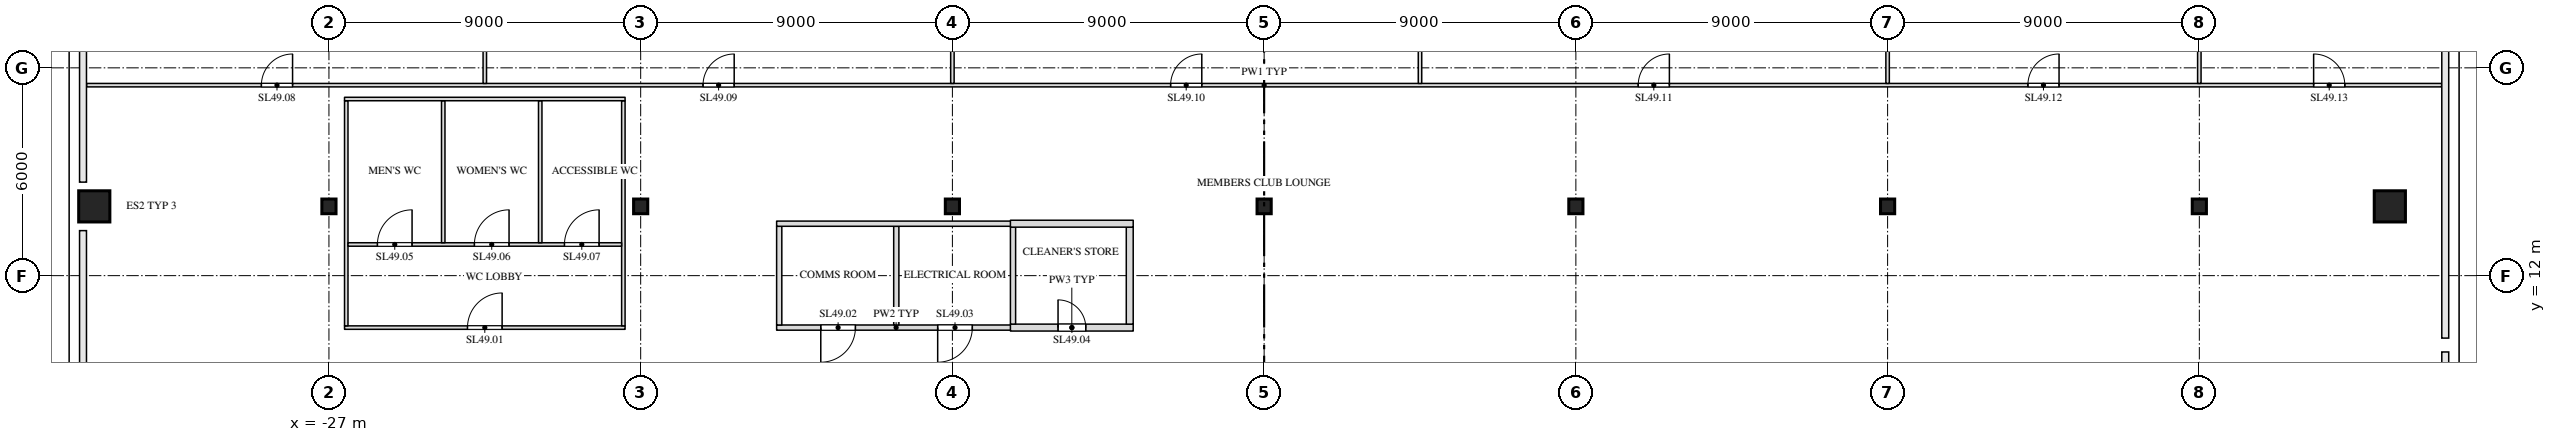
"""IFC4 building model, lengths in metres.
Left out: names, types, materials, properties, quantities, classifications, styles, units other than length and angle.
Written with IfcOpenShell. Run it as: python <this file> out.ifc"""

import sys

from ifc_helpers import new_model, si_unit, direction, frame, frame_2d, origin, origin_2d, place, context, subcontext, project, spatial, rectangle, i_section, extrude, clip, halfspace, element, fill, save


model = new_model("IFC4")
c1 = context("Model", 3, precision=1e-05, world=origin(), true_north=direction((0.0, 1.0)))
c2 = subcontext(c1, "Body", "Model", "MODEL_VIEW")
j1 = project(units=[si_unit("LENGTHUNIT", "METRE"), si_unit("PLANEANGLEUNIT", "RADIAN")], contexts=[c1])
p1 = place(None, origin())
s1 = spatial("IfcSite", under=j1, at=p1, CompositionType="ELEMENT")
p2 = place(p1, origin())
s2 = spatial("IfcBuilding", under=s1, at=p2, CompositionType="ELEMENT")
p3 = place(p2, frame((0.0, 0.0, 212.5)))
s3 = spatial("IfcBuildingStorey", under=s2, at=p3, CompositionType="ELEMENT", Elevation=212.5)
p4 = place(p3, frame((-32.5, 14.0, 0.0), z_axis=(-0.728199992693, 0.0, 0.685364699005), x_axis=(0.0, -1.0, 0.0)))
e1 = element("IfcColumn", 1, at=p4, inside=s3, PredefinedType="COLUMN", context=c2, shape_type="Clipping", body=[
    clip(extrude(rectangle(XDim=0.9, YDim=0.9, at=origin_2d()), origin(), (0.0, 0.0, 1.0), 5.836), halfspace(frame((0.0, 0.0, 0.478)), True)),
])
for number, where, z_axis, x_axis in (
    (2, (-27.0, 14.0, 0.0), (0.0, 0.0, 1.0), (1.0, 0.0, 0.0)),
    (3, (-18.0, 14.0, 0.0), (0.0, 0.0, 1.0), (1.0, 0.0, 0.0)),
    (4, (-9.0, 14.0, 0.0), (0.0, 0.0, 1.0), (1.0, 0.0, 0.0)),
    (5, (0.0, 14.0, 0.0), (0.0, 0.0, 1.0), (1.0, 0.0, 0.0)),
    (6, (9.0, 14.0, 0.0), (0.0, 0.0, 1.0), (1.0, 0.0, 0.0)),
    (7, (18.0, 14.0, 0.0), (0.0, 0.0, 1.0), (1.0, 0.0, 0.0)),
    (8, (27.0, 14.0, 0.0), (0.0, 0.0, 1.0), (1.0, 0.0, 0.0)),
):
    element("IfcColumn", number, at=place(p3, frame(where, z_axis=z_axis, x_axis=x_axis)), inside=s3, PredefinedType="COLUMN", context=c2, shape_type="SweptSolid", body=[
        extrude(i_section(OverallWidth=0.409, OverallDepth=0.424, WebThickness=0.033, FlangeThickness=0.052, at=origin_2d()), origin(), (0.0, 0.0, 1.0), 4.0),
    ])
p5 = place(p3, frame((32.5, 14.0, 0.0), z_axis=(0.0, 0.0, 1.0), x_axis=(1.0, 0.0, 0.0)))
e9 = element("IfcColumn", 9, at=p5, inside=s3, PredefinedType="COLUMN", context=c2, shape_type="SweptSolid", body=[
    extrude(rectangle(XDim=0.9, YDim=0.9, at=origin_2d()), origin(), (0.0, 0.0, 1.0), 4.0),
])
p6 = place(p3, frame((-26.55, 10.5, 0.0), z_axis=(0.0, 0.0, 1.0), x_axis=(1.0, 0.0, 0.0)))
e10 = element("IfcWall", 10, at=p6, inside=s3, PredefinedType="PARTITIONING", context=c2, shape_type="SweptSolid", body=[
    extrude(rectangle(XDim=8.1, YDim=0.1, at=frame_2d((4.05, 0.0))), origin(), (0.0, 0.0, 1.0), 3.65),
])
p7 = place(p6, frame((3.55, 0.0, 0.0)))
e11 = element("IfcOpeningElement", 11, at=p7, cuts=e10, PredefinedType="OPENING", context=c2, shape_type="SweptSolid", body=[
    extrude(rectangle(XDim=1.0, YDim=2.1, at=frame_2d((0.5, 1.05))), frame((0.0, 0.062, 0.0), z_axis=(0.0, -1.0, 0.0), x_axis=(1.0, 0.0, 0.0)), (0.0, 0.0, 1.0), 0.124),
])
for number, where, z_axis, x_axis in (
    (12, (-26.5, 10.55, 0.0), (0.0, 0.0, 1.0), (0.0, 1.0, 0.0)),
    (13, (-18.5, 10.55, 0.0), (0.0, 0.0, 1.0), (0.0, 1.0, 0.0)),
):
    element("IfcWall", number, at=place(p3, frame(where, z_axis=z_axis, x_axis=x_axis)), inside=s3, PredefinedType="PARTITIONING", context=c2, shape_type="SweptSolid", body=[
        extrude(rectangle(XDim=6.5, YDim=0.1, at=frame_2d((3.25, 0.0))), origin(), (0.0, 0.0, 1.0), 3.65),
    ])
p8 = place(p3, frame((-14.075, 10.5, 0.0), z_axis=(0.0, 0.0, 1.0), x_axis=(1.0, 0.0, 0.0)))
e14 = element("IfcWall", 14, at=p8, inside=s3, PredefinedType="PARTITIONING", context=c2, shape_type="SweptSolid", body=[
    extrude(rectangle(XDim=6.9, YDim=0.15, at=frame_2d((3.45, 0.0))), origin(), (0.0, 0.0, 1.0), 3.65),
])
p9 = place(p8, frame((1.275, 0.0, 0.0)))
e15 = element("IfcOpeningElement", 15, at=p9, cuts=e14, PredefinedType="OPENING", context=c2, shape_type="SweptSolid", body=[
    extrude(rectangle(XDim=1.0, YDim=2.1, at=frame_2d((0.5, 1.05))), frame((0.0, 0.087, 0.0), z_axis=(0.0, -1.0, 0.0), x_axis=(1.0, 0.0, 0.0)), (0.0, 0.0, 1.0), 0.174),
])
p10 = place(p8, frame((4.65, 0.0, 0.0)))
e16 = element("IfcOpeningElement", 16, at=p10, cuts=e14, PredefinedType="OPENING", context=c2, shape_type="SweptSolid", body=[
    extrude(rectangle(XDim=1.0, YDim=2.1, at=frame_2d((0.5, 1.05))), frame((0.0, 0.087, 0.0), z_axis=(0.0, -1.0, 0.0), x_axis=(1.0, 0.0, 0.0)), (0.0, 0.0, 1.0), 0.174),
])
for number, where, z_axis, x_axis in (
    (17, (-14.0, 10.575, 0.0), (0.0, 0.0, 1.0), (0.0, 1.0, 0.0)),
    (18, (-10.62, 10.575, 0.0), (0.0, 0.0, 1.0), (0.0, 1.0, 0.0)),
):
    element("IfcWall", number, at=place(p3, frame(where, z_axis=z_axis, x_axis=x_axis)), inside=s3, PredefinedType="PARTITIONING", context=c2, shape_type="SweptSolid", body=[
        extrude(rectangle(XDim=2.85, YDim=0.15, at=frame_2d((1.425, 0.0))), origin(), (0.0, 0.0, 1.0), 3.65),
    ])
p11 = place(p3, frame((-7.325, 10.5, 0.0), z_axis=(0.0, 0.0, 1.0), x_axis=(1.0, 0.0, 0.0)))
e19 = element("IfcWall", 19, at=p11, inside=s3, PredefinedType="PARTITIONING", context=c2, shape_type="SweptSolid", body=[
    extrude(rectangle(XDim=3.545, YDim=0.2, at=frame_2d((1.772, 0.0))), origin(), (0.0, 0.0, 1.0), 3.65),
])
p12 = place(p11, frame((1.375, 0.0, 0.0)))
e20 = element("IfcOpeningElement", 20, at=p12, cuts=e19, PredefinedType="OPENING", context=c2, shape_type="SweptSolid", body=[
    extrude(rectangle(XDim=0.8, YDim=2.1, at=frame_2d((0.4, 1.05))), frame((0.0, 0.112, 0.0), z_axis=(0.0, -1.0, 0.0), x_axis=(1.0, 0.0, 0.0)), (0.0, 0.0, 1.0), 0.224),
])
p13 = place(p3, frame((-7.25, 10.6, 0.0), z_axis=(0.0, 0.0, 1.0), x_axis=(0.0, 1.0, 0.0)))
e21 = element("IfcWall", 21, at=p13, inside=s3, PredefinedType="PARTITIONING", context=c2, shape_type="SweptSolid", body=[
    extrude(rectangle(XDim=2.8, YDim=0.15, at=frame_2d((1.4, 0.0))), origin(), (0.0, 0.0, 1.0), 3.65),
])
p14 = place(p3, frame((-3.88, 10.6, 0.0), z_axis=(0.0, 0.0, 1.0), x_axis=(0.0, 1.0, 0.0)))
e22 = element("IfcWall", 22, at=p14, inside=s3, PredefinedType="PARTITIONING", context=c2, shape_type="SweptSolid", body=[
    extrude(rectangle(XDim=2.8, YDim=0.2, at=frame_2d((1.4, 0.0))), origin(), (0.0, 0.0, 1.0), 3.65),
])
p15 = place(p3, frame((-26.45, 12.9, 0.0), z_axis=(0.0, 0.0, 1.0), x_axis=(1.0, 0.0, 0.0)))
e23 = element("IfcWall", 23, at=p15, inside=s3, PredefinedType="PARTITIONING", context=c2, shape_type="SweptSolid", body=[
    extrude(rectangle(XDim=7.9, YDim=0.1, at=frame_2d((3.95, 0.0))), origin(), (0.0, 0.0, 1.0), 3.65),
])
p16 = place(p15, frame((0.85, 0.0, 0.0)))
e24 = element("IfcOpeningElement", 24, at=p16, cuts=e23, PredefinedType="OPENING", context=c2, shape_type="SweptSolid", body=[
    extrude(rectangle(XDim=1.0, YDim=2.1, at=frame_2d((0.5, 1.05))), frame((0.0, 0.062, 0.0), z_axis=(0.0, -1.0, 0.0), x_axis=(1.0, 0.0, 0.0)), (0.0, 0.0, 1.0), 0.124),
])
p17 = place(p15, frame((3.65, 0.0, 0.0)))
e25 = element("IfcOpeningElement", 25, at=p17, cuts=e23, PredefinedType="OPENING", context=c2, shape_type="SweptSolid", body=[
    extrude(rectangle(XDim=1.0, YDim=2.1, at=frame_2d((0.5, 1.05))), frame((0.0, 0.062, 0.0), z_axis=(0.0, -1.0, 0.0), x_axis=(1.0, 0.0, 0.0)), (0.0, 0.0, 1.0), 0.124),
])
p18 = place(p15, frame((6.25, 0.0, 0.0)))
e26 = element("IfcOpeningElement", 26, at=p18, cuts=e23, PredefinedType="OPENING", context=c2, shape_type="SweptSolid", body=[
    extrude(rectangle(XDim=1.0, YDim=2.1, at=frame_2d((0.5, 1.05))), frame((0.0, 0.062, 0.0), z_axis=(0.0, -1.0, 0.0), x_axis=(1.0, 0.0, 0.0)), (0.0, 0.0, 1.0), 0.124),
])
for number, where, z_axis, x_axis in (
    (27, (-23.7, 12.95, 0.0), (0.0, 0.0, 1.0), (0.0, 1.0, 0.0)),
    (28, (-20.9, 12.95, 0.0), (0.0, 0.0, 1.0), (0.0, 1.0, 0.0)),
):
    element("IfcWall", number, at=place(p3, frame(where, z_axis=z_axis, x_axis=x_axis)), inside=s3, PredefinedType="PARTITIONING", context=c2, shape_type="SweptSolid", body=[
        extrude(rectangle(XDim=4.1, YDim=0.1, at=frame_2d((2.05, 0.0))), origin(), (0.0, 0.0, 1.0), 3.65),
    ])
p19 = place(p3, frame((-14.075, 13.5, 0.0), z_axis=(0.0, 0.0, 1.0), x_axis=(1.0, 0.0, 0.0)))
e29 = element("IfcWall", 29, at=p19, inside=s3, PredefinedType="PARTITIONING", context=c2, shape_type="SweptSolid", body=[
    extrude(rectangle(XDim=6.9, YDim=0.15, at=frame_2d((3.45, 0.0))), origin(), (0.0, 0.0, 1.0), 3.65),
])
p20 = place(p3, frame((-7.325, 13.5, 0.0), z_axis=(0.0, 0.0, 1.0), x_axis=(1.0, 0.0, 0.0)))
e30 = element("IfcWall", 30, at=p20, inside=s3, PredefinedType="PARTITIONING", context=c2, shape_type="SweptSolid", body=[
    extrude(rectangle(XDim=3.545, YDim=0.2, at=frame_2d((1.772, 0.0))), origin(), (0.0, 0.0, 1.0), 3.65),
])
p21 = place(p3, frame((-26.55, 17.1, 0.0), z_axis=(0.0, 0.0, 1.0), x_axis=(1.0, 0.0, 0.0)))
e31 = element("IfcWall", 31, at=p21, inside=s3, PredefinedType="PARTITIONING", context=c2, shape_type="SweptSolid", body=[
    extrude(rectangle(XDim=8.1, YDim=0.1, at=frame_2d((4.05, 0.0))), origin(), (0.0, 0.0, 1.0), 3.65),
])
p22 = place(p3, frame((-33.996, 17.5, 0.0), z_axis=(0.0, 0.0, 1.0), x_axis=(1.0, 0.0, 0.0)))
e32 = element("IfcWall", 32, at=p22, inside=s3, PredefinedType="PARTITIONING", context=c2, shape_type="SweptSolid", body=[
    extrude(rectangle(XDim=67.992, YDim=0.1, at=frame_2d((33.996, 0.0))), origin(), (0.0, 0.0, 1.0), 3.65),
])
p23 = place(p22, frame((5.046, 0.0, 0.0)))
e33 = element("IfcOpeningElement", 33, at=p23, cuts=e32, PredefinedType="OPENING", context=c2, shape_type="SweptSolid", body=[
    extrude(rectangle(XDim=0.9, YDim=2.1, at=frame_2d((0.45, 1.05))), frame((0.0, 0.062, 0.0), z_axis=(0.0, -1.0, 0.0), x_axis=(1.0, 0.0, 0.0)), (0.0, 0.0, 1.0), 0.124),
])
p24 = place(p22, frame((17.796, 0.0, 0.0)))
e34 = element("IfcOpeningElement", 34, at=p24, cuts=e32, PredefinedType="OPENING", context=c2, shape_type="SweptSolid", body=[
    extrude(rectangle(XDim=0.9, YDim=2.1, at=frame_2d((0.45, 1.05))), frame((0.0, 0.062, 0.0), z_axis=(0.0, -1.0, 0.0), x_axis=(1.0, 0.0, 0.0)), (0.0, 0.0, 1.0), 0.124),
])
p25 = place(p22, frame((31.296, 0.0, 0.0)))
e35 = element("IfcOpeningElement", 35, at=p25, cuts=e32, PredefinedType="OPENING", context=c2, shape_type="SweptSolid", body=[
    extrude(rectangle(XDim=0.9, YDim=2.1, at=frame_2d((0.45, 1.05))), frame((0.0, 0.062, 0.0), z_axis=(0.0, -1.0, 0.0), x_axis=(1.0, 0.0, 0.0)), (0.0, 0.0, 1.0), 0.124),
])
p26 = place(p22, frame((44.796, 0.0, 0.0)))
e36 = element("IfcOpeningElement", 36, at=p26, cuts=e32, PredefinedType="OPENING", context=c2, shape_type="SweptSolid", body=[
    extrude(rectangle(XDim=0.9, YDim=2.1, at=frame_2d((0.45, 1.05))), frame((0.0, 0.062, 0.0), z_axis=(0.0, -1.0, 0.0), x_axis=(1.0, 0.0, 0.0)), (0.0, 0.0, 1.0), 0.124),
])
p27 = place(p22, frame((56.046, 0.0, 0.0)))
e37 = element("IfcOpeningElement", 37, at=p27, cuts=e32, PredefinedType="OPENING", context=c2, shape_type="SweptSolid", body=[
    extrude(rectangle(XDim=0.9, YDim=2.1, at=frame_2d((0.45, 1.05))), frame((0.0, 0.062, 0.0), z_axis=(0.0, -1.0, 0.0), x_axis=(1.0, 0.0, 0.0)), (0.0, 0.0, 1.0), 0.124),
])
p28 = place(p22, frame((64.296, 0.0, 0.0)))
e38 = element("IfcOpeningElement", 38, at=p28, cuts=e32, PredefinedType="OPENING", context=c2, shape_type="SweptSolid", body=[
    extrude(rectangle(XDim=0.9, YDim=2.1, at=frame_2d((0.45, 1.05))), frame((0.0, 0.062, 0.0), z_axis=(0.0, -1.0, 0.0), x_axis=(1.0, 0.0, 0.0)), (0.0, 0.0, 1.0), 0.124),
])
p29 = place(p3, frame((-22.5, 17.55, 0.0), z_axis=(0.0, 0.0, 1.0), x_axis=(0.0, 1.0, 0.0)))
e39 = element("IfcWall", 39, at=p29, inside=s3, PredefinedType="PARTITIONING", context=c2, shape_type="SweptSolid", body=[
    extrude(rectangle(XDim=11.446, YDim=0.1, at=frame_2d((5.723, 0.0))), origin(), (0.0, 0.0, 1.0), 3.65),
])
p30 = place(p3, frame((-9.0, 17.55, 0.0), z_axis=(0.0, 0.0, 1.0), x_axis=(0.0, 1.0, 0.0)))
e40 = element("IfcWall", 40, at=p30, inside=s3, PredefinedType="PARTITIONING", context=c2, shape_type="SweptSolid", body=[
    extrude(rectangle(XDim=4.238, YDim=0.1, at=frame_2d((2.119, 0.0))), origin(), (0.0, 0.0, 1.0), 3.043),
])
p31 = place(p3, frame((4.5, 17.55, 0.0), z_axis=(0.0, 0.0, 1.0), x_axis=(0.0, 1.0, 0.0)))
e41 = element("IfcWall", 41, at=p31, inside=s3, PredefinedType="PARTITIONING", context=c2, shape_type="SweptSolid", body=[
    extrude(rectangle(XDim=11.446, YDim=0.1, at=frame_2d((5.723, 0.0))), origin(), (0.0, 0.0, 1.0), 3.65),
])
for number, where, z_axis, x_axis in (
    (42, (18.0, 17.55, 0.0), (0.0, 0.0, 1.0), (0.0, 1.0, 0.0)),
    (43, (27.0, 17.55, 0.0), (0.0, 0.0, 1.0), (0.0, 1.0, 0.0)),
):
    element("IfcWall", number, at=place(p3, frame(where, z_axis=z_axis, x_axis=x_axis)), inside=s3, PredefinedType="PARTITIONING", context=c2, shape_type="SweptSolid", body=[
        extrude(rectangle(XDim=4.238, YDim=0.1, at=frame_2d((2.119, 0.0))), origin(), (0.0, 0.0, 1.0), 3.043),
    ])
p32 = place(p7, origin())
e44 = element("IfcDoor", 44, at=p32, inside=s3, OperationType="SINGLE_SWING_RIGHT", PredefinedType="DOOR", context=c2, shape_type="SweptSolid", body=[
    extrude(rectangle(XDim=1.0, YDim=2.1, at=frame_2d((0.5, 1.05))), frame((0.0, 0.025, 0.0), z_axis=(0.0, -1.0, 0.0), x_axis=(1.0, 0.0, 0.0)), (0.0, 0.0, 1.0), 0.05),
])
fill(e11, e44)
p33 = place(p9, origin())
e45 = element("IfcDoor", 45, at=p33, inside=s3, OperationType="SINGLE_SWING_RIGHT", PredefinedType="DOOR", context=c2, shape_type="SweptSolid", body=[
    extrude(rectangle(XDim=1.0, YDim=2.1, at=frame_2d((0.5, 1.05))), frame((0.0, 0.025, 0.0), z_axis=(0.0, -1.0, 0.0), x_axis=(1.0, 0.0, 0.0)), (0.0, 0.0, 1.0), 0.05),
])
fill(e15, e45)
p34 = place(p10, origin())
e46 = element("IfcDoor", 46, at=p34, inside=s3, OperationType="SINGLE_SWING_RIGHT", PredefinedType="DOOR", context=c2, shape_type="SweptSolid", body=[
    extrude(rectangle(XDim=1.0, YDim=2.1, at=frame_2d((0.5, 1.05))), frame((0.0, 0.025, 0.0), z_axis=(0.0, -1.0, 0.0), x_axis=(1.0, 0.0, 0.0)), (0.0, 0.0, 1.0), 0.05),
])
fill(e16, e46)
p35 = place(p12, origin())
e47 = element("IfcDoor", 47, at=p35, inside=s3, OperationType="SINGLE_SWING_LEFT", PredefinedType="DOOR", context=c2, shape_type="SweptSolid", body=[
    extrude(rectangle(XDim=0.8, YDim=2.1, at=frame_2d((0.4, 1.05))), frame((0.0, 0.025, 0.0), z_axis=(0.0, -1.0, 0.0), x_axis=(1.0, 0.0, 0.0)), (0.0, 0.0, 1.0), 0.05),
])
fill(e20, e47)
p36 = place(p16, origin())
e48 = element("IfcDoor", 48, at=p36, inside=s3, OperationType="SINGLE_SWING_RIGHT", PredefinedType="DOOR", context=c2, shape_type="SweptSolid", body=[
    extrude(rectangle(XDim=1.0, YDim=2.1, at=frame_2d((0.5, 1.05))), frame((0.0, 0.025, 0.0), z_axis=(0.0, -1.0, 0.0), x_axis=(1.0, 0.0, 0.0)), (0.0, 0.0, 1.0), 0.05),
])
fill(e24, e48)
p37 = place(p17, origin())
e49 = element("IfcDoor", 49, at=p37, inside=s3, OperationType="SINGLE_SWING_RIGHT", PredefinedType="DOOR", context=c2, shape_type="SweptSolid", body=[
    extrude(rectangle(XDim=1.0, YDim=2.1, at=frame_2d((0.5, 1.05))), frame((0.0, 0.025, 0.0), z_axis=(0.0, -1.0, 0.0), x_axis=(1.0, 0.0, 0.0)), (0.0, 0.0, 1.0), 0.05),
])
fill(e25, e49)
p38 = place(p18, origin())
e50 = element("IfcDoor", 50, at=p38, inside=s3, OperationType="SINGLE_SWING_RIGHT", PredefinedType="DOOR", context=c2, shape_type="SweptSolid", body=[
    extrude(rectangle(XDim=1.0, YDim=2.1, at=frame_2d((0.5, 1.05))), frame((0.0, 0.025, 0.0), z_axis=(0.0, -1.0, 0.0), x_axis=(1.0, 0.0, 0.0)), (0.0, 0.0, 1.0), 0.05),
])
fill(e26, e50)
p39 = place(p23, origin())
e51 = element("IfcDoor", 51, at=p39, inside=s3, OperationType="SINGLE_SWING_RIGHT", PredefinedType="DOOR", context=c2, shape_type="SweptSolid", body=[
    extrude(rectangle(XDim=0.9, YDim=2.1, at=frame_2d((0.45, 1.05))), frame((0.0, 0.025, 0.0), z_axis=(0.0, -1.0, 0.0), x_axis=(1.0, 0.0, 0.0)), (0.0, 0.0, 1.0), 0.05),
])
fill(e33, e51)
p40 = place(p24, origin())
e52 = element("IfcDoor", 52, at=p40, inside=s3, OperationType="SINGLE_SWING_RIGHT", PredefinedType="DOOR", context=c2, shape_type="SweptSolid", body=[
    extrude(rectangle(XDim=0.9, YDim=2.1, at=frame_2d((0.45, 1.05))), frame((0.0, 0.025, 0.0), z_axis=(0.0, -1.0, 0.0), x_axis=(1.0, 0.0, 0.0)), (0.0, 0.0, 1.0), 0.05),
])
fill(e34, e52)
p41 = place(p25, origin())
e53 = element("IfcDoor", 53, at=p41, inside=s3, OperationType="SINGLE_SWING_RIGHT", PredefinedType="DOOR", context=c2, shape_type="SweptSolid", body=[
    extrude(rectangle(XDim=0.9, YDim=2.1, at=frame_2d((0.45, 1.05))), frame((0.0, 0.025, 0.0), z_axis=(0.0, -1.0, 0.0), x_axis=(1.0, 0.0, 0.0)), (0.0, 0.0, 1.0), 0.05),
])
fill(e35, e53)
p42 = place(p26, origin())
e54 = element("IfcDoor", 54, at=p42, inside=s3, OperationType="SINGLE_SWING_RIGHT", PredefinedType="DOOR", context=c2, shape_type="SweptSolid", body=[
    extrude(rectangle(XDim=0.9, YDim=2.1, at=frame_2d((0.45, 1.05))), frame((0.0, 0.025, 0.0), z_axis=(0.0, -1.0, 0.0), x_axis=(1.0, 0.0, 0.0)), (0.0, 0.0, 1.0), 0.05),
])
fill(e36, e54)
p43 = place(p27, origin())
e55 = element("IfcDoor", 55, at=p43, inside=s3, OperationType="SINGLE_SWING_RIGHT", PredefinedType="DOOR", context=c2, shape_type="SweptSolid", body=[
    extrude(rectangle(XDim=0.9, YDim=2.1, at=frame_2d((0.45, 1.05))), frame((0.0, 0.025, 0.0), z_axis=(0.0, -1.0, 0.0), x_axis=(1.0, 0.0, 0.0)), (0.0, 0.0, 1.0), 0.05),
])
fill(e37, e55)
p44 = place(p28, origin())
e56 = element("IfcDoor", 56, at=p44, inside=s3, OperationType="SINGLE_SWING_LEFT", PredefinedType="DOOR", context=c2, shape_type="SweptSolid", body=[
    extrude(rectangle(XDim=0.9, YDim=2.1, at=frame_2d((0.45, 1.05))), frame((0.0, 0.025, 0.0), z_axis=(0.0, -1.0, 0.0), x_axis=(1.0, 0.0, 0.0)), (0.0, 0.0, 1.0), 0.05),
])
fill(e38, e56)
save(model, sys.argv[1])
